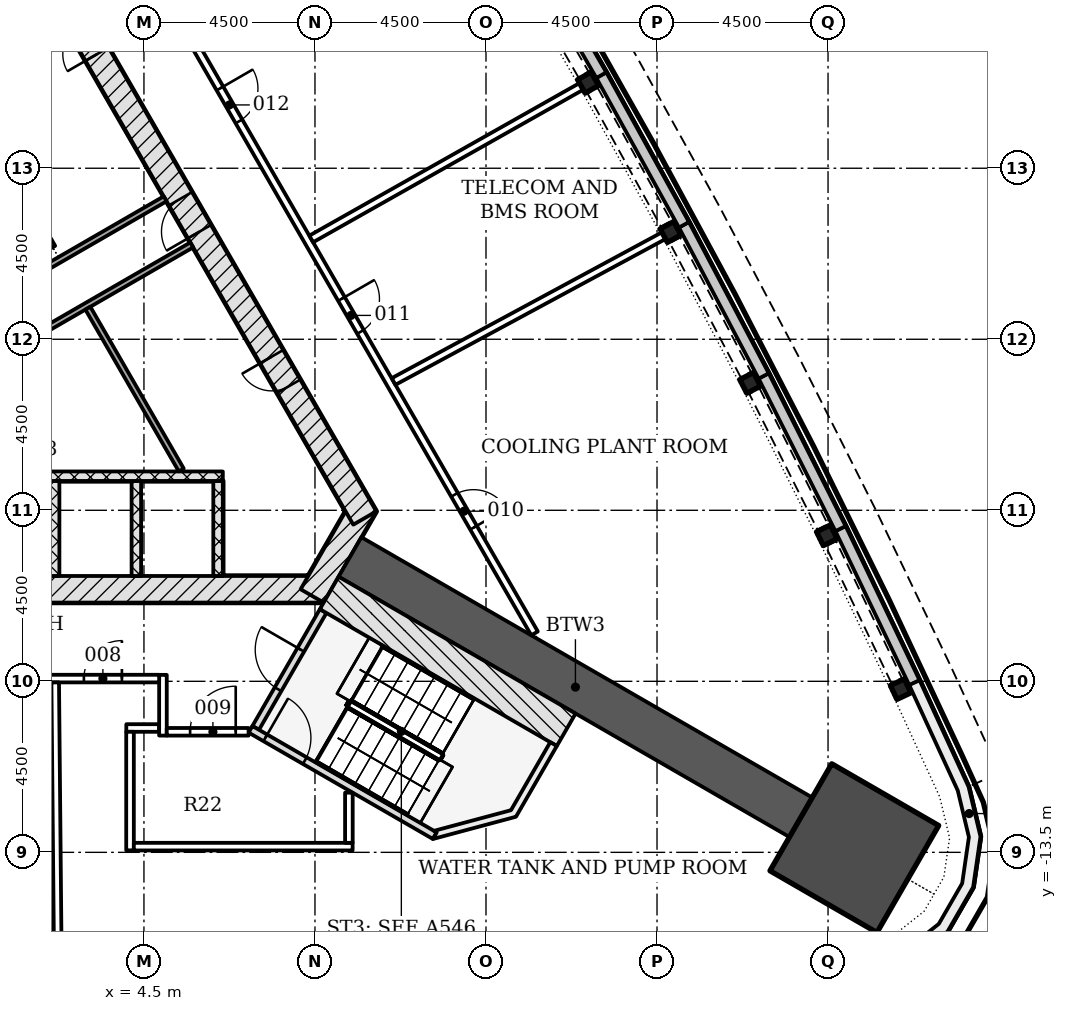
"""IFC4 building model, lengths in metres.
Left out: names, types, materials, properties, quantities, classifications, styles, units other than length and angle.
Written with IfcOpenShell. Run it as: python <this file> out.ifc"""

import sys

from ifc_helpers import new_model, si_unit, direction, frame, frame_2d, origin, origin_2d, place, context, subcontext, project, spatial, polyline, rectangle, i_section, outline, extrude, element, fill, save


model = new_model("IFC4")
c1 = context("Model", 3, precision=1e-05, world=origin(), true_north=direction((0.0, 1.0)))
c2 = subcontext(c1, "Body", "Model", "MODEL_VIEW")
j1 = project(units=[si_unit("LENGTHUNIT", "METRE"), si_unit("PLANEANGLEUNIT", "RADIAN")], contexts=[c1])
p1 = place(None, origin())
s1 = spatial("IfcSite", under=j1, at=p1, CompositionType="ELEMENT")
p2 = place(p1, origin())
s2 = spatial("IfcBuilding", under=s1, at=p2, CompositionType="ELEMENT")
p3 = place(p2, frame((0.0, 0.0, 52.8)))
s3 = spatial("IfcBuildingStorey", under=s2, at=p3, CompositionType="ELEMENT", Elevation=52.8)
p4 = place(p3, frame((-9.229, -6.578, -0.3), z_axis=(0.0, 0.0, 1.0), x_axis=(1.0, 0.0, 0.0)))
e1 = element("IfcWall", 1, at=p4, inside=s3, PredefinedType="SHEAR", context=c2, shape_type="SweptSolid", body=[
    extrude(rectangle(XDim=18.458, YDim=0.7, at=frame_2d((9.229, 0.0))), origin(), (0.0, 0.0, 1.0), 5.5),
])
p5 = place(p4, frame((1.079, 0.0, 0.3)))
e2 = element("IfcOpeningElement", 2, at=p5, cuts=e1, PredefinedType="OPENING", context=c2, shape_type="SweptSolid", body=[
    extrude(rectangle(XDim=0.9, YDim=2.1, at=frame_2d((0.45, 1.05))), frame((0.0, 0.36, 0.0), z_axis=(0.0, -1.0, 0.0), x_axis=(1.0, 0.0, 0.0)), (0.0, 0.0, 1.0), 0.72),
])
p6 = place(p3, frame((8.926, -6.753, -0.3), z_axis=(0.0, 0.0, 1.0), x_axis=(0.500042739161, 0.866000726912, 0.0)))
e3 = element("IfcWall", 3, at=p6, inside=s3, PredefinedType="SHEAR", context=c2, shape_type="SweptSolid", body=[
    extrude(rectangle(XDim=2.771, YDim=0.7, at=frame_2d((1.386, 0.0))), origin(), (0.0, 0.0, 1.0), 5.5),
])
p7 = place(p3, frame((10.311, -4.703, -0.3), z_axis=(0.0, 0.0, 1.0), x_axis=(-0.500001446645, 0.866024568562, 0.0)))
e4 = element("IfcWall", 4, at=p7, inside=s3, PredefinedType="SHEAR", context=c2, shape_type="SweptSolid", body=[
    extrude(rectangle(XDim=18.458, YDim=0.7, at=frame_2d((9.229, 0.0))), origin(), (0.0, 0.0, 1.0), 5.5),
])
p8 = place(p7, frame((8.7, 0.0, 0.3)))
e5 = element("IfcOpeningElement", 5, at=p8, cuts=e4, PredefinedType="OPENING", context=c2, shape_type="SweptSolid", body=[
    extrude(rectangle(XDim=1.0, YDim=2.1, at=frame_2d((0.5, 1.05))), frame((0.0, 0.36, 0.0), z_axis=(0.0, -1.0, 0.0), x_axis=(1.0, 0.0, 0.0)), (0.0, 0.0, 1.0), 0.72),
])
p9 = place(p7, frame((4.002, 0.0, 0.3)))
e6 = element("IfcOpeningElement", 6, at=p9, cuts=e4, PredefinedType="OPENING", context=c2, shape_type="SweptSolid", body=[
    extrude(rectangle(XDim=0.9, YDim=2.1, at=frame_2d((0.45, 1.05))), frame((0.0, 0.36, 0.0), z_axis=(0.0, -1.0, 0.0), x_axis=(1.0, 0.0, 0.0)), (0.0, 0.0, 1.0), 0.72),
])
p10 = place(p7, frame((14.093, 0.0, 0.3)))
e7 = element("IfcOpeningElement", 7, at=p10, cuts=e4, PredefinedType="OPENING", context=c2, shape_type="SweptSolid", body=[
    extrude(rectangle(XDim=0.9, YDim=2.1, at=frame_2d((0.45, 1.05))), frame((0.0, 0.36, 0.0), z_axis=(0.0, -1.0, 0.0), x_axis=(1.0, 0.0, 0.0)), (0.0, 0.0, 1.0), 0.72),
])
p11 = place(p3, frame((9.922, -5.728, -0.3), z_axis=(0.0, 0.0, 1.0), x_axis=(0.866030067197, -0.499991922645, 0.0)))
e8 = element("IfcWall", 8, at=p11, inside=s3, PredefinedType="SHEAR", context=c2, shape_type="SweptSolid", body=[
    extrude(rectangle(XDim=13.698, YDim=1.2, at=frame_2d((6.849, 0.0))), origin(), (0.0, 0.0, 1.0), 5.5),
])
p12 = place(p3, frame((23.192, -13.39, -0.3), z_axis=(0.0, 0.0, 1.0), x_axis=(0.866025403784, -0.5, 0.0)))
e9 = element("IfcColumn", 9, at=p12, inside=s3, PredefinedType="COLUMN", context=c2, shape_type="SweptSolid", body=[
    extrude(rectangle(XDim=3.25, YDim=3.25, at=origin_2d()), origin(), (0.0, 0.0, 1.0), 5.5),
])
for number, where, z_axis, x_axis in (
    (10, (24.411, -9.206, -0.3), (0.0, 0.0, 1.0), (-0.424, 0.906, 0.0)),
    (11, (22.469, -5.158, -0.3), (0.0, 0.0, 1.0), (-0.441, 0.897, 0.0)),
    (12, (20.451, -1.148, -0.3), (0.0, 0.0, 1.0), (-0.458, 0.889, 0.0)),
    (13, (18.356, 2.823, -0.3), (0.0, 0.0, 1.0), (-0.475, 0.88, 0.0)),
    (14, (16.186, 6.753, -0.3), (0.0, 0.0, 1.0), (-0.492, 0.871, 0.0)),
):
    element("IfcColumn", number, at=place(p3, frame(where, z_axis=z_axis, x_axis=x_axis)), inside=s3, PredefinedType="COLUMN", context=c2, shape_type="SweptSolid", body=[
        extrude(i_section(OverallWidth=0.404, OverallDepth=0.406, WebThickness=0.027, FlangeThickness=0.044, FilletRadius=0.015, at=origin_2d()), origin(), (0.0, 0.0, 1.0), 5.5),
    ])
p13 = place(p3, origin())
e15 = element("IfcWall", 15, at=p13, inside=s3, PredefinedType="NOTDEFINED", context=c2, shape_type="SweptSolid", body=[
    extrude(outline(polyline([(24.909, -8.973), (22.963, -4.916), (22.692, -5.045), (24.638, -9.103), (24.909, -8.973)])), origin(), (0.0, 0.0, 1.0), 1.2),
])
p14 = place(p3, origin())
e16 = element("IfcWall", 16, at=p14, inside=s3, PredefinedType="NOTDEFINED", context=c2, shape_type="SweptSolid", body=[
    extrude(outline(polyline([(22.963, -4.916), (20.94, -0.896), (20.672, -1.031), (22.695, -5.05), (22.963, -4.916)])), origin(), (0.0, 0.0, 1.0), 1.2),
])
p15 = place(p3, origin())
e17 = element("IfcWall", 17, at=p15, inside=s3, PredefinedType="NOTDEFINED", context=c2, shape_type="SweptSolid", body=[
    extrude(outline(polyline([(20.94, -0.896), (18.84, 3.084), (18.575, 2.944), (20.674, -1.036), (20.94, -0.896)])), origin(), (0.0, 0.0, 1.0), 1.2),
])
p16 = place(p3, origin())
e18 = element("IfcWall", 18, at=p16, inside=s3, PredefinedType="NOTDEFINED", context=c2, shape_type="SweptSolid", body=[
    extrude(outline(polyline([(18.84, 3.084), (16.665, 7.023), (16.402, 6.878), (18.578, 2.939), (18.84, 3.084)])), origin(), (0.0, 0.0, 1.0), 1.2),
])
p17 = place(p3, origin())
e19 = element("IfcWall", 19, at=p17, inside=s3, PredefinedType="NOTDEFINED", context=c2, shape_type="SweptSolid", body=[
    extrude(outline(polyline([(16.665, 7.023), (14.415, 10.921), (14.155, 10.771), (16.405, 6.874), (16.665, 7.023)])), origin(), (0.0, 0.0, 1.0), 1.2),
])
p18 = place(p3, origin())
e20 = element("IfcWall", 20, at=p18, inside=s3, PredefinedType="NOTDEFINED", context=c2, shape_type="SweptSolid", body=[
    extrude(outline(polyline([(20.225, -17.085), (23.297, -16.8), (24.588, -16.417), (25.645, -15.583), (26.318, -14.417), (26.511, -13.085), (26.198, -11.776), (24.909, -8.973), (24.636, -9.098), (25.913, -11.875), (26.206, -13.099), (26.029, -14.317), (25.414, -15.384), (24.447, -16.146), (23.24, -16.504), (20.197, -16.787), (20.225, -17.085)])), origin(), (0.0, 0.0, 1.0), 5.2),
])
for number, where, z_axis, x_axis in (
    (21, (2.15, -6.228, -0.3), (0.0, 0.0, 1.0), (0.0, 1.0, 0.0)),
    (22, (4.3, -6.228, -0.3), (0.0, 0.0, 1.0), (0.0, 1.0, 0.0)),
    (23, (6.45, -6.228, -0.3), (0.0, 0.0, 1.0), (0.0, 1.0, 0.0)),
):
    element("IfcWall", number, at=place(p3, frame(where, z_axis=z_axis, x_axis=x_axis)), inside=s3, PredefinedType="PARTITIONING", context=c2, shape_type="SweptSolid", body=[
        extrude(rectangle(XDim=2.5, YDim=0.25, at=frame_2d((1.25, 0.0))), origin(), (0.0, 0.0, 1.0), 5.5),
    ])
p19 = place(p3, frame((-6.575, -3.603, 0.0), z_axis=(0.0, 0.0, 1.0), x_axis=(1.0, 0.0, 0.0)))
e24 = element("IfcWall", 24, at=p19, inside=s3, PredefinedType="PARTITIONING", context=c2, shape_type="SweptSolid", body=[
    extrude(rectangle(XDim=13.15, YDim=0.25, at=frame_2d((6.575, 0.0))), origin(), (0.0, 0.0, 1.0), 5.2),
])
p20 = place(p3, frame((-4.548, -1.851, 0.0), z_axis=(0.0, 0.0, 1.0), x_axis=(0.866023939251, 0.500002536638, 0.0)))
e25 = element("IfcWall", 25, at=p20, inside=s3, PredefinedType="PARTITIONING", context=c2, shape_type="SweptSolid", body=[
    extrude(rectangle(XDim=11.092, YDim=0.15, at=frame_2d((5.546, 0.0))), origin(), (0.0, 0.0, 1.0), 5.2),
])
p21 = place(p20, frame((3.497, 0.0, 0.0)))
e26 = element("IfcOpeningElement", 26, at=p21, cuts=e25, PredefinedType="OPENING", context=c2, shape_type="SweptSolid", body=[
    extrude(rectangle(XDim=0.9, YDim=2.1, at=frame_2d((0.45, 1.05))), frame((0.0, 0.085, 0.0), z_axis=(0.0, -1.0, 0.0), x_axis=(1.0, 0.0, 0.0)), (0.0, 0.0, 1.0), 0.17),
])
p22 = place(p3, frame((2.099, 2.42, 0.0), z_axis=(0.0, 0.0, 1.0), x_axis=(-0.499998449073, 0.866026299211, 0.0)))
e27 = element("IfcWall", 27, at=p22, inside=s3, PredefinedType="PARTITIONING", context=c2, shape_type="SweptSolid", body=[
    extrude(rectangle(XDim=4.211, YDim=0.15, at=frame_2d((2.106, 0.0))), origin(), (0.0, 0.0, 1.0), 5.2),
])
p23 = place(p3, frame((-4.454, -3.413, 0.0), z_axis=(0.0, 0.0, 1.0), x_axis=(0.86603043987, 0.499991277142, 0.0)))
e28 = element("IfcWall", 28, at=p23, inside=s3, PredefinedType="PARTITIONING", context=c2, shape_type="SweptSolid", body=[
    extrude(rectangle(XDim=11.792, YDim=0.15, at=frame_2d((5.896, 0.0))), origin(), (0.0, 0.0, 1.0), 5.2),
])
p24 = place(p23, frame((3.847, 0.0, 0.0)))
e29 = element("IfcOpeningElement", 29, at=p24, cuts=e28, PredefinedType="OPENING", context=c2, shape_type="SweptSolid", body=[
    extrude(rectangle(XDim=0.9, YDim=2.1, at=frame_2d((0.45, 1.05))), frame((0.0, 0.085, 0.0), z_axis=(0.0, -1.0, 0.0), x_axis=(1.0, 0.0, 0.0)), (0.0, 0.0, 1.0), 0.17),
])
p25 = place(p3, frame((5.482, -3.439, 0.0), z_axis=(0.0, 0.0, 1.0), x_axis=(-0.500006183238, 0.866021833861, 0.0)))
e30 = element("IfcWall", 30, at=p25, inside=s3, PredefinedType="PARTITIONING", context=c2, shape_type="SweptSolid", body=[
    extrude(rectangle(XDim=4.916, YDim=0.15, at=frame_2d((2.458, 0.0))), origin(), (0.0, 0.0, 1.0), 5.2),
])
p26 = place(p3, frame((7.44, -10.226, -0.3), z_axis=(0.0, 0.0, 1.0), x_axis=(0.500022077904, 0.866012656725, 0.0)))
e31 = element("IfcWall", 31, at=p26, inside=s3, PredefinedType="SHEAR", context=c2, shape_type="SweptSolid", body=[
    extrude(rectangle(XDim=3.55, YDim=0.2, at=frame_2d((1.775, 0.0))), origin(), (0.0, 0.0, 1.0), 5.5),
])
p27 = place(p26, frame((1.175, 0.0, 0.3)))
e32 = element("IfcOpeningElement", 32, at=p27, cuts=e31, PredefinedType="OPENING", context=c2, shape_type="SweptSolid", body=[
    extrude(rectangle(XDim=1.2, YDim=2.1, at=frame_2d((0.6, 1.05))), frame((0.0, 0.11, 0.0), z_axis=(0.0, -1.0, 0.0), x_axis=(1.0, 0.0, 0.0)), (0.0, 0.0, 1.0), 0.22),
])
p28 = place(p3, frame((7.304, -10.262, -0.3), z_axis=(0.0, 0.0, 1.0), x_axis=(0.866026594901, -0.49999793692, 0.0)))
e33 = element("IfcWall", 33, at=p28, inside=s3, PredefinedType="SHEAR", context=c2, shape_type="SweptSolid", body=[
    extrude(rectangle(XDim=5.6, YDim=0.2, at=frame_2d((2.8, 0.0))), origin(), (0.0, 0.0, 1.0), 5.5),
])
p29 = place(p28, frame((0.45, 0.0, 0.3)))
e34 = element("IfcOpeningElement", 34, at=p29, cuts=e33, PredefinedType="OPENING", context=c2, shape_type="SweptSolid", body=[
    extrude(rectangle(XDim=1.2, YDim=2.1, at=frame_2d((0.6, 1.05))), frame((0.0, 0.11, 0.0), z_axis=(0.0, -1.0, 0.0), x_axis=(1.0, 0.0, 0.0)), (0.0, 0.0, 1.0), 0.22),
])
p30 = place(p3, frame((9.375, -6.675, -0.3), z_axis=(0.0, 0.0, 1.0), x_axis=(0.866026919366, -0.499997374926, 0.0)))
e35 = element("IfcWall", 35, at=p30, inside=s3, PredefinedType="SHEAR", context=c2, shape_type="SweptSolid", body=[
    extrude(rectangle(XDim=7.2, YDim=0.986, at=frame_2d((3.6, 0.0))), origin(), (0.0, 0.0, 1.0), 5.5),
])
p31 = place(p3, frame((0.0, 0.0, -0.3)))
e36 = element("IfcWall", 36, at=p31, inside=s3, PredefinedType="SHEAR", context=c2, shape_type="SweptSolid", body=[
    extrude(outline(polyline([(12.104, -13.149), (14.289, -12.563), (15.364, -10.701), (15.191, -10.601), (14.157, -12.392), (12.132, -12.934), (12.204, -12.976), (12.204, -12.976), (12.204, -12.976), (12.204, -12.976), (12.204, -12.976), (12.204, -12.976), (12.204, -12.976), (12.204, -12.976), (12.204, -12.976), (12.204, -12.976), (12.204, -12.976), (12.204, -12.976), (12.204, -12.976), (12.204, -12.976), (12.204, -12.976), (12.204, -12.976), (12.204, -12.976), (12.104, -13.149)])), origin(), (0.0, 0.0, 1.0), 5.5),
])
p32 = place(p3, frame((4.036, -10.228, 0.0), z_axis=(0.0, 0.0, 1.0), x_axis=(1.0, 0.0, 0.0)))
e37 = element("IfcWall", 37, at=p32, inside=s3, PredefinedType="PARTITIONING", context=c2, shape_type="SweptSolid", body=[
    extrude(rectangle(XDim=0.864, YDim=0.2, at=frame_2d((0.432, 0.0))), origin(), (0.0, 0.0, 1.0), 5.2),
])
p33 = place(p3, frame((5.0, -10.428, 0.0), z_axis=(0.0, 0.0, 1.0), x_axis=(0.0, 1.0, 0.0)))
e38 = element("IfcWall", 38, at=p33, inside=s3, PredefinedType="PARTITIONING", context=c2, shape_type="SweptSolid", body=[
    extrude(rectangle(XDim=1.598, YDim=0.2, at=frame_2d((0.799, 0.0))), origin(), (0.0, 0.0, 1.0), 5.2),
])
p34 = place(p3, frame((5.1, -10.328, 0.0), z_axis=(0.0, 0.0, 1.0), x_axis=(1.0, 0.0, 0.0)))
e39 = element("IfcWall", 39, at=p34, inside=s3, PredefinedType="PARTITIONING", context=c2, shape_type="SweptSolid", body=[
    extrude(rectangle(XDim=2.154, YDim=0.2, at=frame_2d((1.077, 0.0))), origin(), (0.0, 0.0, 1.0), 4.578),
])
p35 = place(p34, frame((0.615, 0.0, 0.0)))
e40 = element("IfcOpeningElement", 40, at=p35, cuts=e39, PredefinedType="OPENING", context=c2, shape_type="SweptSolid", body=[
    extrude(rectangle(XDim=1.2, YDim=2.1, at=frame_2d((0.6, 1.05))), frame((0.0, 0.11, 0.0), z_axis=(0.0, -1.0, 0.0), x_axis=(1.0, 0.0, 0.0)), (0.0, 0.0, 1.0), 0.22),
])
p36 = place(p3, frame((-14.091, -8.928, 0.0), z_axis=(0.0, 0.0, 1.0), x_axis=(1.0, 0.0, 0.0)))
e41 = element("IfcWall", 41, at=p36, inside=s3, PredefinedType="PARTITIONING", context=c2, shape_type="SweptSolid", body=[
    extrude(rectangle(XDim=18.991, YDim=0.2, at=frame_2d((9.495, 0.0))), origin(), (0.0, 0.0, 1.0), 4.578),
])
p37 = place(p36, frame((7.642, 0.0, 0.0)))
e42 = element("IfcOpeningElement", 42, at=p37, cuts=e41, PredefinedType="OPENING", context=c2, shape_type="SweptSolid", body=[
    extrude(rectangle(XDim=1.0, YDim=2.1, at=frame_2d((0.5, 1.05))), frame((0.0, 0.11, 0.0), z_axis=(0.0, -1.0, 0.0), x_axis=(1.0, 0.0, 0.0)), (0.0, 0.0, 1.0), 0.22),
])
p38 = place(p36, frame((17.011, 0.0, 0.0)))
e43 = element("IfcOpeningElement", 43, at=p38, cuts=e41, PredefinedType="OPENING", context=c2, shape_type="SweptSolid", body=[
    extrude(rectangle(XDim=1.0, YDim=2.1, at=frame_2d((0.5, 1.05))), frame((0.0, 0.11, 0.0), z_axis=(0.0, -1.0, 0.0), x_axis=(1.0, 0.0, 0.0)), (0.0, 0.0, 1.0), 0.22),
])
p39 = place(p3, frame((2.165, -9.029, 0.0), z_axis=(0.0, 0.0, 1.0), x_axis=(0.009569508604, -0.999954211204, 0.0)))
e44 = element("IfcWall", 44, at=p39, inside=s3, PredefinedType="PARTITIONING", context=c2, shape_type="SweptSolid", body=[
    extrude(rectangle(XDim=8.215, YDim=0.2, at=frame_2d((4.107, 0.0))), origin(), (0.0, 0.0, 1.0), 4.578),
])
p40 = place(p3, frame((4.134, -10.328, 0.0), z_axis=(0.0, 0.0, 1.0), x_axis=(0.0, -1.0, 0.0)))
e45 = element("IfcWall", 45, at=p40, inside=s3, PredefinedType="PARTITIONING", context=c2, shape_type="SweptSolid", body=[
    extrude(rectangle(XDim=3.12, YDim=0.2, at=frame_2d((1.56, 0.0))), origin(), (0.0, 0.0, 1.0), 5.2),
])
p41 = place(p3, frame((4.234, -13.35, 0.0), z_axis=(0.0, 0.0, 1.0), x_axis=(1.0, 0.0, 0.0)))
e46 = element("IfcWall", 46, at=p41, inside=s3, PredefinedType="PARTITIONING", context=c2, shape_type="SweptSolid", body=[
    extrude(rectangle(XDim=5.757, YDim=0.2, at=frame_2d((2.878, 0.0))), origin(), (0.0, 0.0, 1.0), 4.578),
])
p42 = place(p3, frame((9.893, -13.25, 0.0), z_axis=(0.0, 0.0, 1.0), x_axis=(0.0, 1.0, 0.0)))
e47 = element("IfcWall", 47, at=p42, inside=s3, PredefinedType="PARTITIONING", context=c2, shape_type="SweptSolid", body=[
    extrude(rectangle(XDim=1.32, YDim=0.2, at=frame_2d((0.66, 0.0))), origin(), (0.0, 0.0, 1.0), 5.2),
])
p43 = place(p3, frame((5.282, 8.708, 0.0), z_axis=(0.0, 0.0, 1.0), x_axis=(0.500007704848, -0.866020955343, 0.0)))
e48 = element("IfcWall", 48, at=p43, inside=s3, PredefinedType="PARTITIONING", context=c2, shape_type="SweptSolid", body=[
    extrude(rectangle(XDim=18.991, YDim=0.2, at=frame_2d((9.496, 0.0))), origin(), (0.0, 0.0, 1.0), 4.578),
])
p44 = place(p43, frame((14.779, 0.0, 0.0)))
e49 = element("IfcOpeningElement", 49, at=p44, cuts=e48, PredefinedType="OPENING", context=c2, shape_type="SweptSolid", body=[
    extrude(rectangle(XDim=1.0, YDim=2.1, at=frame_2d((0.5, 1.05))), frame((0.0, 0.11, 0.0), z_axis=(0.0, -1.0, 0.0), x_axis=(1.0, 0.0, 0.0)), (0.0, 0.0, 1.0), 0.22),
])
p45 = place(p43, frame((8.83, 0.0, 0.0)))
e50 = element("IfcOpeningElement", 50, at=p45, cuts=e48, PredefinedType="OPENING", context=c2, shape_type="SweptSolid", body=[
    extrude(rectangle(XDim=1.0, YDim=2.1, at=frame_2d((0.5, 1.05))), frame((0.0, 0.11, 0.0), z_axis=(0.0, -1.0, 0.0), x_axis=(1.0, 0.0, 0.0)), (0.0, 0.0, 1.0), 0.22),
])
p46 = place(p43, frame((2.435, 0.0, 0.0)))
e51 = element("IfcOpeningElement", 51, at=p46, cuts=e48, PredefinedType="OPENING", context=c2, shape_type="SweptSolid", body=[
    extrude(rectangle(XDim=1.0, YDim=2.1, at=frame_2d((0.5, 1.05))), frame((0.0, 0.11, 0.0), z_axis=(0.0, -1.0, 0.0), x_axis=(1.0, 0.0, 0.0)), (0.0, 0.0, 1.0), 0.22),
])
p47 = place(p3, frame((11.069, -1.11, 0.0), z_axis=(0.0, 0.0, 1.0), x_axis=(0.879990497743, 0.474991288218, 0.0)))
e52 = element("IfcWall", 52, at=p47, inside=s3, PredefinedType="PARTITIONING", context=c2, shape_type="SweptSolid", body=[
    extrude(rectangle(XDim=8.131, YDim=0.2, at=frame_2d((4.065, 0.0))), origin(), (0.0, 0.0, 1.0), 4.578),
])
p48 = place(p3, frame((8.902, 2.64, 0.0), z_axis=(0.0, 0.0, 1.0), x_axis=(0.87077197932, 0.491687054976, 0.0)))
e53 = element("IfcWall", 53, at=p48, inside=s3, PredefinedType="PARTITIONING", context=c2, shape_type="SweptSolid", body=[
    extrude(rectangle(XDim=8.215, YDim=0.2, at=frame_2d((4.107, 0.0))), origin(), (0.0, 0.0, 1.0), 4.578),
])
p49 = place(p8, origin())
e54 = element("IfcDoor", 54, at=p49, inside=s3, OperationType="SINGLE_SWING_LEFT", PredefinedType="DOOR", context=c2, shape_type="SweptSolid", body=[
    extrude(rectangle(XDim=1.0, YDim=2.1, at=frame_2d((0.5, 1.05))), frame((0.0, 0.075, 0.0), z_axis=(0.0, -1.0, 0.0), x_axis=(1.0, 0.0, 0.0)), (0.0, 0.0, 1.0), 0.15),
])
fill(e5, e54)
p50 = place(p9, origin())
e55 = element("IfcDoor", 55, at=p50, inside=s3, OperationType="SINGLE_SWING_RIGHT", PredefinedType="DOOR", context=c2, shape_type="SweptSolid", body=[
    extrude(rectangle(XDim=0.9, YDim=2.1, at=frame_2d((0.45, 1.05))), frame((0.0, 0.075, 0.0), z_axis=(0.0, -1.0, 0.0), x_axis=(1.0, 0.0, 0.0)), (0.0, 0.0, 1.0), 0.15),
])
fill(e6, e55)
p51 = place(p10, origin())
e56 = element("IfcDoor", 56, at=p51, inside=s3, OperationType="SINGLE_SWING_LEFT", PredefinedType="DOOR", context=c2, shape_type="SweptSolid", body=[
    extrude(rectangle(XDim=0.9, YDim=2.1, at=frame_2d((0.45, 1.05))), frame((0.0, 0.075, 0.0), z_axis=(0.0, -1.0, 0.0), x_axis=(1.0, 0.0, 0.0)), (0.0, 0.0, 1.0), 0.15),
])
fill(e7, e56)
p52 = place(p27, origin())
e57 = element("IfcDoor", 57, at=p52, inside=s3, OperationType="SINGLE_SWING_RIGHT", PredefinedType="DOOR", context=c2, shape_type="SweptSolid", body=[
    extrude(rectangle(XDim=1.2, YDim=2.1, at=frame_2d((0.6, 1.05))), frame((0.0, 0.025, 0.0), z_axis=(0.0, -1.0, 0.0), x_axis=(1.0, 0.0, 0.0)), (0.0, 0.0, 1.0), 0.05),
])
fill(e32, e57)
p53 = place(p29, origin())
e58 = element("IfcDoor", 58, at=p53, inside=s3, OperationType="SINGLE_SWING_LEFT", PredefinedType="DOOR", context=c2, shape_type="SweptSolid", body=[
    extrude(rectangle(XDim=1.2, YDim=2.1, at=frame_2d((0.6, 1.05))), frame((0.0, 0.025, 0.0), z_axis=(0.0, -1.0, 0.0), x_axis=(1.0, 0.0, 0.0)), (0.0, 0.0, 1.0), 0.05),
])
fill(e34, e58)
p54 = place(p38, origin())
e59 = element("IfcDoor", 59, at=p54, inside=s3, OperationType="SINGLE_SWING_RIGHT", PredefinedType="DOOR", context=c2, shape_type="SweptSolid", body=[
    extrude(rectangle(XDim=1.0, YDim=2.1, at=frame_2d((0.5, 1.05))), frame((0.0, 0.025, 0.0), z_axis=(0.0, -1.0, 0.0), x_axis=(1.0, 0.0, 0.0)), (0.0, 0.0, 1.0), 0.05),
])
fill(e43, e59)
p55 = place(p35, origin())
e60 = element("IfcDoor", 60, at=p55, inside=s3, OperationType="SINGLE_SWING_RIGHT", PredefinedType="DOOR", context=c2, shape_type="SweptSolid", body=[
    extrude(rectangle(XDim=1.2, YDim=2.1, at=frame_2d((0.6, 1.05))), frame((0.0, 0.025, 0.0), z_axis=(0.0, -1.0, 0.0), x_axis=(1.0, 0.0, 0.0)), (0.0, 0.0, 1.0), 0.05),
])
fill(e40, e60)
p56 = place(p44, origin())
e61 = element("IfcDoor", 61, at=p56, inside=s3, OperationType="SINGLE_SWING_RIGHT", PredefinedType="DOOR", context=c2, shape_type="SweptSolid", body=[
    extrude(rectangle(XDim=1.0, YDim=2.1, at=frame_2d((0.5, 1.05))), frame((0.0, 0.025, 0.0), z_axis=(0.0, -1.0, 0.0), x_axis=(1.0, 0.0, 0.0)), (0.0, 0.0, 1.0), 0.05),
])
fill(e49, e61)
p57 = place(p45, origin())
e62 = element("IfcDoor", 62, at=p57, inside=s3, OperationType="SINGLE_SWING_LEFT", PredefinedType="DOOR", context=c2, shape_type="SweptSolid", body=[
    extrude(rectangle(XDim=1.0, YDim=2.1, at=frame_2d((0.5, 1.05))), frame((0.0, 0.025, 0.0), z_axis=(0.0, -1.0, 0.0), x_axis=(1.0, 0.0, 0.0)), (0.0, 0.0, 1.0), 0.05),
])
fill(e50, e62)
p58 = place(p46, origin())
e63 = element("IfcDoor", 63, at=p58, inside=s3, OperationType="SINGLE_SWING_LEFT", PredefinedType="DOOR", context=c2, shape_type="SweptSolid", body=[
    extrude(rectangle(XDim=1.0, YDim=2.1, at=frame_2d((0.5, 1.05))), frame((0.0, 0.025, 0.0), z_axis=(0.0, -1.0, 0.0), x_axis=(1.0, 0.0, 0.0)), (0.0, 0.0, 1.0), 0.05),
])
fill(e51, e63)
save(model, sys.argv[1])
